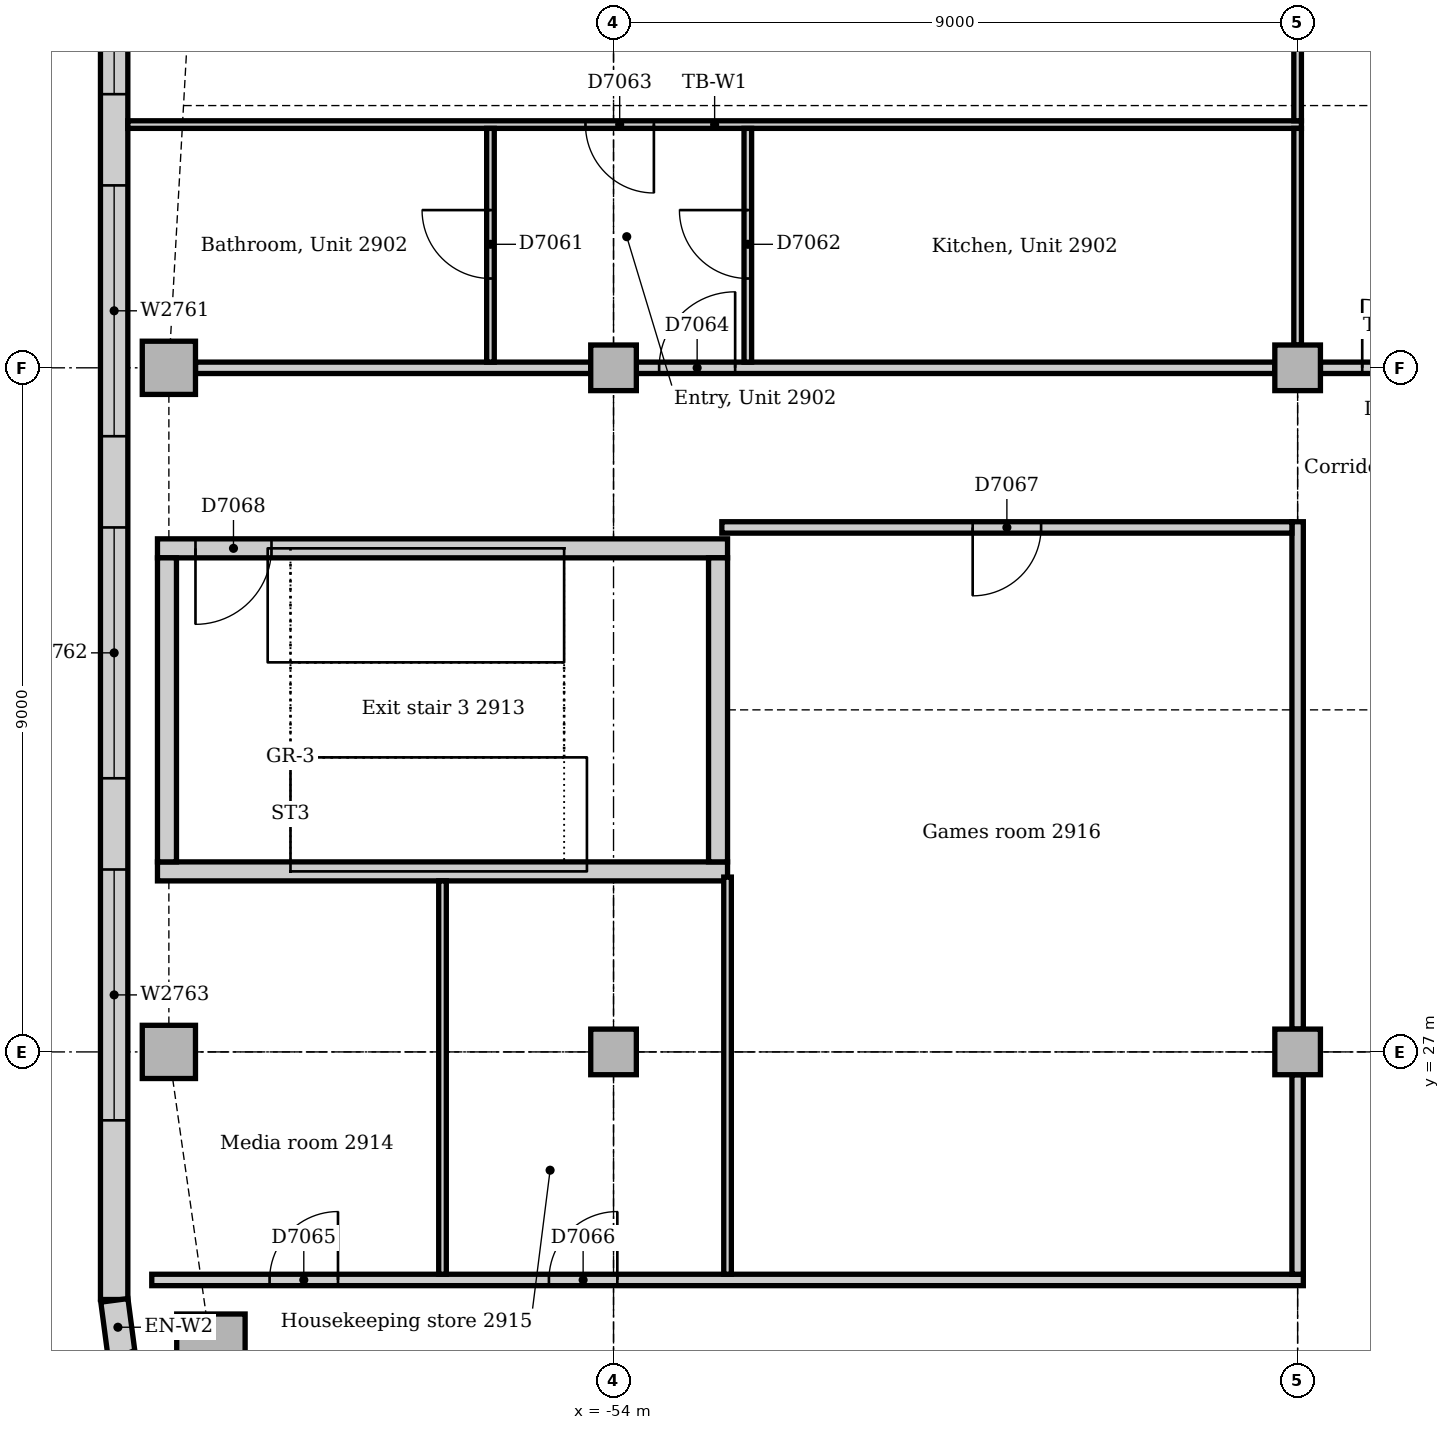
"""IFC4 building model, lengths in metres.
Left out: names, types, materials, properties, quantities, classifications, styles, units other than length and angle.
Written with IfcOpenShell. Run it as: python <this file> out.ifc"""

import sys

from ifc_helpers import new_model, si_unit, direction, frame, frame_2d, origin, origin_2d, place, context, subcontext, project, spatial, rectangle, extrude, element, fill, save


model = new_model("IFC4")
c1 = context("Model", 3, precision=1e-05, world=origin(), true_north=direction((0.0, 1.0)))
c2 = subcontext(c1, "Body", "Model", "MODEL_VIEW")
j1 = project(units=[si_unit("LENGTHUNIT", "METRE"), si_unit("PLANEANGLEUNIT", "RADIAN")], contexts=[c1])
p1 = place(None, origin())
s1 = spatial("IfcSite", under=j1, at=p1, CompositionType="ELEMENT")
p2 = place(p1, origin())
s2 = spatial("IfcBuilding", under=s1, at=p2, CompositionType="ELEMENT")
p3 = place(p2, frame((0.0, 0.0, 124.0)))
s3 = spatial("IfcBuildingStorey", under=s2, at=p3, CompositionType="ELEMENT", Elevation=124.0)
p4 = place(p3, frame((-60.0, 29.375, 0.0), z_axis=(0.0, 0.0, 1.0), x_axis=(1.0, 0.0, 0.0)))
e1 = element("IfcWall", 1, at=p4, inside=s3, PredefinedType="SOLIDWALL", context=c2, shape_type="SweptSolid", body=[
    extrude(rectangle(XDim=7.5, YDim=0.25, at=frame_2d((3.75, 0.0))), origin(), (0.0, 0.0, 1.0), 4.0),
])
p5 = place(p3, frame((-52.5, 33.625, 0.0), z_axis=(0.0, 0.0, 1.0), x_axis=(-1.0, 0.0, 0.0)))
e2 = element("IfcWall", 2, at=p5, inside=s3, PredefinedType="SOLIDWALL", context=c2, shape_type="SweptSolid", body=[
    extrude(rectangle(XDim=7.5, YDim=0.25, at=frame_2d((3.75, 0.0))), origin(), (0.0, 0.0, 1.0), 4.0),
])
p6 = place(p5, frame((6.0, 0.0, 0.0)))
e3 = element("IfcOpeningElement", 3, at=p6, cuts=e2, PredefinedType="OPENING", context=c2, shape_type="SweptSolid", body=[
    extrude(rectangle(XDim=1.0, YDim=2.1, at=frame_2d((0.5, 1.05))), frame((0.0, 0.135, 0.0), z_axis=(0.0, -1.0, 0.0), x_axis=(1.0, 0.0, 0.0)), (0.0, 0.0, 1.0), 0.27),
])
for number, where, z_axis, x_axis in (
    (4, (-52.625, 29.5, 0.0), (0.0, 0.0, 1.0), (0.0, 1.0, 0.0)),
    (5, (-59.875, 33.5, 0.0), (0.0, 0.0, 1.0), (0.0, -1.0, 0.0)),
):
    element("IfcWall", number, at=place(p3, frame(where, z_axis=z_axis, x_axis=x_axis)), inside=s3, PredefinedType="SOLIDWALL", context=c2, shape_type="SweptSolid", body=[
        extrude(rectangle(XDim=4.0, YDim=0.25, at=frame_2d((2.0, 0.0))), origin(), (0.0, 0.0, 1.0), 4.0),
    ])
p7 = place(p3, frame((-59.297, 23.102, 0.0), z_axis=(0.0, 0.0, 1.0), x_axis=(1.0, 0.0, 0.0)))
e6 = element("IfcColumn", 6, at=p7, inside=s3, PredefinedType="COLUMN", context=c2, shape_type="SweptSolid", body=[
    extrude(rectangle(XDim=0.9, YDim=0.9, at=origin_2d()), origin(), (0.0, 0.0, 1.0), 3.85),
])
for number, where, z_axis, x_axis in (
    (7, (-59.85, 27.0, 0.0), (0.0, 0.0, 1.0), (1.0, 0.0, 0.0)),
    (8, (-59.85, 36.0, 0.0), (0.0, 0.0, 1.0), (1.0, 0.0, 0.0)),
):
    element("IfcColumn", number, at=place(p3, frame(where, z_axis=z_axis, x_axis=x_axis)), inside=s3, PredefinedType="COLUMN", context=c2, shape_type="SweptSolid", body=[
        extrude(rectangle(XDim=0.7, YDim=0.7, at=origin_2d()), origin(), (0.0, 0.0, 1.0), 3.85),
    ])
for number, where, z_axis, x_axis in (
    (9, (-54.0, 27.0, 0.0), (0.0, 0.0, 1.0), (1.0, 0.0, 0.0)),
    (10, (-54.0, 36.0, 0.0), (0.0, 0.0, 1.0), (1.0, 0.0, 0.0)),
    (11, (-45.0, 27.0, 0.0), (0.0, 0.0, 1.0), (1.0, 0.0, 0.0)),
    (12, (-45.0, 36.0, 0.0), (0.0, 0.0, 1.0), (1.0, 0.0, 0.0)),
):
    element("IfcColumn", number, at=place(p3, frame(where, z_axis=z_axis, x_axis=x_axis)), inside=s3, PredefinedType="COLUMN", context=c2, shape_type="SweptSolid", body=[
        extrude(rectangle(XDim=0.6, YDim=0.6, at=origin_2d()), origin(), (0.0, 0.0, 1.0), 3.85),
    ])
p8 = place(p3, frame((-60.57, 45.257, 0.0), z_axis=(0.0, 0.0, 1.0), x_axis=(0.0, -1.0, 0.0)))
e13 = element("IfcWall", 13, at=p8, inside=s3, PredefinedType="STANDARD", context=c2, shape_type="SweptSolid", body=[
    extrude(rectangle(XDim=21.515, YDim=0.36, at=frame_2d((10.757, 0.0))), origin(), (0.0, 0.0, 1.0), 3.85),
])
p9 = place(p8, frame((2.357, 0.0, 0.9)))
e14 = element("IfcOpeningElement", 14, at=p9, cuts=e13, PredefinedType="OPENING", context=c2, shape_type="SweptSolid", body=[
    extrude(rectangle(XDim=3.3, YDim=1.6, at=frame_2d((1.65, 0.8))), frame((0.0, 0.19, 0.0), z_axis=(0.0, -1.0, 0.0), x_axis=(1.0, 0.0, 0.0)), (0.0, 0.0, 1.0), 0.38),
])
p10 = place(p8, frame((6.857, 0.0, 0.9)))
e15 = element("IfcOpeningElement", 15, at=p10, cuts=e13, PredefinedType="OPENING", context=c2, shape_type="SweptSolid", body=[
    extrude(rectangle(XDim=3.3, YDim=1.6, at=frame_2d((1.65, 0.8))), frame((0.0, 0.19, 0.0), z_axis=(0.0, -1.0, 0.0), x_axis=(1.0, 0.0, 0.0)), (0.0, 0.0, 1.0), 0.38),
])
p11 = place(p8, frame((11.357, 0.0, 0.9)))
e16 = element("IfcOpeningElement", 16, at=p11, cuts=e13, PredefinedType="OPENING", context=c2, shape_type="SweptSolid", body=[
    extrude(rectangle(XDim=3.3, YDim=1.6, at=frame_2d((1.65, 0.8))), frame((0.0, 0.19, 0.0), z_axis=(0.0, -1.0, 0.0), x_axis=(1.0, 0.0, 0.0)), (0.0, 0.0, 1.0), 0.38),
])
p12 = place(p8, frame((15.857, 0.0, 0.9)))
e17 = element("IfcOpeningElement", 17, at=p12, cuts=e13, PredefinedType="OPENING", context=c2, shape_type="SweptSolid", body=[
    extrude(rectangle(XDim=3.3, YDim=1.6, at=frame_2d((1.65, 0.8))), frame((0.0, 0.19, 0.0), z_axis=(0.0, -1.0, 0.0), x_axis=(1.0, 0.0, 0.0)), (0.0, 0.0, 1.0), 0.38),
])
p13 = place(p3, frame((-60.567, 23.731, 0.0), z_axis=(0.0, 0.0, 1.0), x_axis=(0.13055608231, -0.99144092581, 0.0)))
e18 = element("IfcWall", 18, at=p13, inside=s3, PredefinedType="STANDARD", context=c2, shape_type="SweptSolid", body=[
    extrude(rectangle(XDim=0.713, YDim=0.36, at=frame_2d((0.356, 0.0))), origin(), (0.0, 0.0, 1.0), 3.85),
])
p14 = place(p3, frame((-44.7, 36.0, 0.0), z_axis=(0.0, 0.0, 1.0), x_axis=(1.0, 0.0, 0.0)))
e19 = element("IfcWall", 19, at=p14, inside=s3, PredefinedType="PARTITIONING", context=c2, shape_type="SweptSolid", body=[
    extrude(rectangle(XDim=1.975, YDim=0.15, at=frame_2d((0.988, 0.0))), origin(), (0.0, 0.0, 1.0), 3.602),
])
p15 = place(p14, frame((0.55, 0.0, 0.0)))
e20 = element("IfcOpeningElement", 20, at=p15, cuts=e19, PredefinedType="OPENING", context=c2, shape_type="SweptSolid", body=[
    extrude(rectangle(XDim=0.9, YDim=2.1, at=frame_2d((0.45, 1.05))), frame((0.0, 0.085, 0.0), z_axis=(0.0, -1.0, 0.0), x_axis=(1.0, 0.0, 0.0)), (0.0, 0.0, 1.0), 0.17),
])
p16 = place(p3, frame((-53.7, 36.0, 0.0), z_axis=(0.0, 0.0, 1.0), x_axis=(1.0, 0.0, 0.0)))
e21 = element("IfcWall", 21, at=p16, inside=s3, PredefinedType="PARTITIONING", context=c2, shape_type="SweptSolid", body=[
    extrude(rectangle(XDim=8.4, YDim=0.15, at=frame_2d((4.2, 0.0))), origin(), (0.0, 0.0, 1.0), 3.262),
])
p17 = place(p16, frame((0.3, 0.0, 0.0)))
e22 = element("IfcOpeningElement", 22, at=p17, cuts=e21, PredefinedType="OPENING", context=c2, shape_type="SweptSolid", body=[
    extrude(rectangle(XDim=1.0, YDim=2.1, at=frame_2d((0.5, 1.05))), frame((0.0, 0.085, 0.0), z_axis=(0.0, -1.0, 0.0), x_axis=(1.0, 0.0, 0.0)), (0.0, 0.0, 1.0), 0.17),
])
p18 = place(p3, frame((-59.5, 36.0, 0.0), z_axis=(0.0, 0.0, 1.0), x_axis=(1.0, 0.0, 0.0)))
e23 = element("IfcWall", 23, at=p18, inside=s3, PredefinedType="PARTITIONING", context=c2, shape_type="SweptSolid", body=[
    extrude(rectangle(XDim=5.2, YDim=0.15, at=frame_2d((2.6, 0.0))), origin(), (0.0, 0.0, 1.0), 3.35),
])
p19 = place(p3, frame((-60.075, 24.0, 0.0), z_axis=(0.0, 0.0, 1.0), x_axis=(1.0, 0.0, 0.0)))
e24 = element("IfcWall", 24, at=p19, inside=s3, PredefinedType="PARTITIONING", context=c2, shape_type="SweptSolid", body=[
    extrude(rectangle(XDim=15.15, YDim=0.15, at=frame_2d((7.575, 0.0))), origin(), (0.0, 0.0, 1.0), 3.85),
])
p20 = place(p19, frame((1.55, 0.0, 0.0)))
e25 = element("IfcOpeningElement", 25, at=p20, cuts=e24, PredefinedType="OPENING", context=c2, shape_type="SweptSolid", body=[
    extrude(rectangle(XDim=0.9, YDim=2.1, at=frame_2d((0.45, 1.05))), frame((0.0, 0.085, 0.0), z_axis=(0.0, -1.0, 0.0), x_axis=(1.0, 0.0, 0.0)), (0.0, 0.0, 1.0), 0.17),
])
p21 = place(p19, frame((5.225, 0.0, 0.0)))
e26 = element("IfcOpeningElement", 26, at=p21, cuts=e24, PredefinedType="OPENING", context=c2, shape_type="SweptSolid", body=[
    extrude(rectangle(XDim=0.9, YDim=2.1, at=frame_2d((0.45, 1.05))), frame((0.0, 0.085, 0.0), z_axis=(0.0, -1.0, 0.0), x_axis=(1.0, 0.0, 0.0)), (0.0, 0.0, 1.0), 0.17),
])
p22 = place(p3, frame((-45.0, 24.075, 0.0), z_axis=(0.0, 0.0, 1.0), x_axis=(0.0, 1.0, 0.0)))
e27 = element("IfcWall", 27, at=p22, inside=s3, PredefinedType="PARTITIONING", context=c2, shape_type="SweptSolid", body=[
    extrude(rectangle(XDim=2.625, YDim=0.15, at=frame_2d((1.312, 0.0))), origin(), (0.0, 0.0, 1.0), 3.362),
])
p23 = place(p3, frame((-45.0, 27.3, 0.0), z_axis=(0.0, 0.0, 1.0), x_axis=(0.0, 1.0, 0.0)))
e28 = element("IfcWall", 28, at=p23, inside=s3, PredefinedType="PARTITIONING", context=c2, shape_type="SweptSolid", body=[
    extrude(rectangle(XDim=6.675, YDim=0.15, at=frame_2d((3.337, 0.0))), origin(), (0.0, 0.0, 1.0), 3.362),
])
p24 = place(p3, frame((-52.575, 33.9, 0.0), z_axis=(0.0, 0.0, 1.0), x_axis=(1.0, 0.0, 0.0)))
e29 = element("IfcWall", 29, at=p24, inside=s3, PredefinedType="PARTITIONING", context=c2, shape_type="SweptSolid", body=[
    extrude(rectangle(XDim=7.5, YDim=0.15, at=frame_2d((3.75, 0.0))), origin(), (0.0, 0.0, 1.0), 3.85),
])
p25 = place(p24, frame((3.3, 0.0, 0.0)))
e30 = element("IfcOpeningElement", 30, at=p25, cuts=e29, PredefinedType="OPENING", context=c2, shape_type="SweptSolid", body=[
    extrude(rectangle(XDim=0.9, YDim=2.1, at=frame_2d((0.45, 1.05))), frame((0.0, 0.085, 0.0), z_axis=(0.0, -1.0, 0.0), x_axis=(1.0, 0.0, 0.0)), (0.0, 0.0, 1.0), 0.17),
])
p26 = place(p3, frame((-60.39, 39.2, 0.0), z_axis=(0.0, 0.0, 1.0), x_axis=(1.0, 0.0, 0.0)))
e31 = element("IfcWall", 31, at=p26, inside=s3, PredefinedType="PARTITIONING", context=c2, shape_type="SweptSolid", body=[
    extrude(rectangle(XDim=15.44, YDim=0.1, at=frame_2d((7.72, 0.0))), origin(), (0.0, 0.0, 1.0), 3.85),
])
p27 = place(p26, frame((6.021, 0.0, 0.0)))
e32 = element("IfcOpeningElement", 32, at=p27, cuts=e31, PredefinedType="OPENING", context=c2, shape_type="SweptSolid", body=[
    extrude(rectangle(XDim=0.9, YDim=2.1, at=frame_2d((0.45, 1.05))), frame((0.0, 0.06, 0.0), z_axis=(0.0, -1.0, 0.0), x_axis=(1.0, 0.0, 0.0)), (0.0, 0.0, 1.0), 0.12),
])
p28 = place(p3, frame((-45.0, 39.25, 0.0), z_axis=(0.0, 0.0, 1.0), x_axis=(0.0, 1.0, 0.0)))
e33 = element("IfcWall", 33, at=p28, inside=s3, PredefinedType="PARTITIONING", context=c2, shape_type="SweptSolid", body=[
    extrude(rectangle(XDim=6.8, YDim=0.1, at=frame_2d((3.4, 0.0))), origin(), (0.0, 0.0, 1.0), 3.362),
])
p29 = place(p3, frame((-45.0, 36.3, 0.0), z_axis=(0.0, 0.0, 1.0), x_axis=(0.0, 1.0, 0.0)))
e34 = element("IfcWall", 34, at=p29, inside=s3, PredefinedType="PARTITIONING", context=c2, shape_type="SweptSolid", body=[
    extrude(rectangle(XDim=2.85, YDim=0.1, at=frame_2d((1.425, 0.0))), origin(), (0.0, 0.0, 1.0), 3.362),
])
p30 = place(p3, frame((-56.25, 24.075, 0.0), z_axis=(0.0, 0.0, 1.0), x_axis=(0.0, 1.0, 0.0)))
e35 = element("IfcWall", 35, at=p30, inside=s3, PredefinedType="PARTITIONING", context=c2, shape_type="SweptSolid", body=[
    extrude(rectangle(XDim=5.175, YDim=0.1, at=frame_2d((2.587, 0.0))), origin(), (0.0, 0.0, 1.0), 3.85),
])
p31 = place(p3, frame((-52.5, 24.075, 0.0), z_axis=(0.0, 0.0, 1.0), x_axis=(0.0, 1.0, 0.0)))
e36 = element("IfcWall", 36, at=p31, inside=s3, PredefinedType="PARTITIONING", context=c2, shape_type="SweptSolid", body=[
    extrude(rectangle(XDim=5.225, YDim=0.1, at=frame_2d((2.612, 0.0))), origin(), (0.0, 0.0, 1.0), 3.85),
])
p32 = place(p3, frame((-55.619, 36.075, 0.0), z_axis=(0.0, 0.0, 1.0), x_axis=(0.0, 1.0, 0.0)))
e37 = element("IfcWall", 37, at=p32, inside=s3, PredefinedType="PARTITIONING", context=c2, shape_type="SweptSolid", body=[
    extrude(rectangle(XDim=3.075, YDim=0.1, at=frame_2d((1.538, 0.0))), origin(), (0.0, 0.0, 1.0), 3.85),
])
p33 = place(p32, frame((1.1, 0.0, 0.0)))
e38 = element("IfcOpeningElement", 38, at=p33, cuts=e37, PredefinedType="OPENING", context=c2, shape_type="SweptSolid", body=[
    extrude(rectangle(XDim=0.9, YDim=2.1, at=frame_2d((0.45, 1.05))), frame((0.0, 0.06, 0.0), z_axis=(0.0, -1.0, 0.0), x_axis=(1.0, 0.0, 0.0)), (0.0, 0.0, 1.0), 0.12),
])
p34 = place(p3, frame((-52.233, 36.075, 0.0), z_axis=(0.0, 0.0, 1.0), x_axis=(0.0, 1.0, 0.0)))
e39 = element("IfcWall", 39, at=p34, inside=s3, PredefinedType="PARTITIONING", context=c2, shape_type="SweptSolid", body=[
    extrude(rectangle(XDim=3.075, YDim=0.1, at=frame_2d((1.538, 0.0))), origin(), (0.0, 0.0, 1.0), 3.85),
])
p35 = place(p34, frame((1.1, 0.0, 0.0)))
e40 = element("IfcOpeningElement", 40, at=p35, cuts=e39, PredefinedType="OPENING", context=c2, shape_type="SweptSolid", body=[
    extrude(rectangle(XDim=0.9, YDim=2.1, at=frame_2d((0.45, 1.05))), frame((0.0, 0.06, 0.0), z_axis=(0.0, -1.0, 0.0), x_axis=(1.0, 0.0, 0.0)), (0.0, 0.0, 1.0), 0.12),
])
p36 = place(p9, origin())
e41 = element("IfcWindow", 41, at=p36, inside=s3, PartitioningType="SINGLE_PANEL", PredefinedType="WINDOW", context=c2, shape_type="SweptSolid", body=[
    extrude(rectangle(XDim=3.3, YDim=1.6, at=frame_2d((1.65, 0.8))), frame((0.0, 0.13, 0.0), z_axis=(0.0, -1.0, 0.0), x_axis=(1.0, 0.0, 0.0)), (0.0, 0.0, 1.0), 0.06),
])
fill(e14, e41)
p37 = place(p10, origin())
e42 = element("IfcWindow", 42, at=p37, inside=s3, PartitioningType="SINGLE_PANEL", PredefinedType="WINDOW", context=c2, shape_type="SweptSolid", body=[
    extrude(rectangle(XDim=3.3, YDim=1.6, at=frame_2d((1.65, 0.8))), frame((0.0, 0.13, 0.0), z_axis=(0.0, -1.0, 0.0), x_axis=(1.0, 0.0, 0.0)), (0.0, 0.0, 1.0), 0.06),
])
fill(e15, e42)
p38 = place(p11, origin())
e43 = element("IfcWindow", 43, at=p38, inside=s3, PartitioningType="SINGLE_PANEL", PredefinedType="WINDOW", context=c2, shape_type="SweptSolid", body=[
    extrude(rectangle(XDim=3.3, YDim=1.6, at=frame_2d((1.65, 0.8))), frame((0.0, 0.13, 0.0), z_axis=(0.0, -1.0, 0.0), x_axis=(1.0, 0.0, 0.0)), (0.0, 0.0, 1.0), 0.06),
])
fill(e16, e43)
p39 = place(p12, origin())
e44 = element("IfcWindow", 44, at=p39, inside=s3, PartitioningType="SINGLE_PANEL", PredefinedType="WINDOW", context=c2, shape_type="SweptSolid", body=[
    extrude(rectangle(XDim=3.3, YDim=1.6, at=frame_2d((1.65, 0.8))), frame((0.0, 0.13, 0.0), z_axis=(0.0, -1.0, 0.0), x_axis=(1.0, 0.0, 0.0)), (0.0, 0.0, 1.0), 0.06),
])
fill(e17, e44)
p40 = place(p15, origin())
e45 = element("IfcDoor", 45, at=p40, inside=s3, OperationType="SINGLE_SWING_LEFT", PredefinedType="DOOR", context=c2, shape_type="SweptSolid", body=[
    extrude(rectangle(XDim=0.9, YDim=2.1, at=frame_2d((0.45, 1.05))), frame((0.0, 0.025, 0.0), z_axis=(0.0, -1.0, 0.0), x_axis=(1.0, 0.0, 0.0)), (0.0, 0.0, 1.0), 0.05),
])
fill(e20, e45)
p41 = place(p33, origin())
e46 = element("IfcDoor", 46, at=p41, inside=s3, OperationType="SINGLE_SWING_RIGHT", PredefinedType="DOOR", context=c2, shape_type="SweptSolid", body=[
    extrude(rectangle(XDim=0.9, YDim=2.1, at=frame_2d((0.45, 1.05))), frame((0.0, 0.025, 0.0), z_axis=(0.0, -1.0, 0.0), x_axis=(1.0, 0.0, 0.0)), (0.0, 0.0, 1.0), 0.05),
])
fill(e38, e46)
p42 = place(p35, origin())
e47 = element("IfcDoor", 47, at=p42, inside=s3, OperationType="SINGLE_SWING_RIGHT", PredefinedType="DOOR", context=c2, shape_type="SweptSolid", body=[
    extrude(rectangle(XDim=0.9, YDim=2.1, at=frame_2d((0.45, 1.05))), frame((0.0, 0.025, 0.0), z_axis=(0.0, -1.0, 0.0), x_axis=(1.0, 0.0, 0.0)), (0.0, 0.0, 1.0), 0.05),
])
fill(e40, e47)
p43 = place(p27, frame((0.9, 0.0, 0.0), z_axis=(0.0, 0.0, 1.0), x_axis=(-1.0, 0.0, 0.0)))
e48 = element("IfcDoor", 48, at=p43, inside=s3, OperationType="SINGLE_SWING_LEFT", PredefinedType="DOOR", context=c2, shape_type="SweptSolid", body=[
    extrude(rectangle(XDim=0.9, YDim=2.1, at=frame_2d((0.45, 1.05))), frame((0.0, 0.025, 0.0), z_axis=(0.0, -1.0, 0.0), x_axis=(1.0, 0.0, 0.0)), (0.0, 0.0, 1.0), 0.05),
])
fill(e32, e48)
p44 = place(p17, origin())
e49 = element("IfcDoor", 49, at=p44, inside=s3, OperationType="SINGLE_SWING_RIGHT", PredefinedType="DOOR", context=c2, shape_type="SweptSolid", body=[
    extrude(rectangle(XDim=1.0, YDim=2.1, at=frame_2d((0.5, 1.05))), frame((0.0, 0.025, 0.0), z_axis=(0.0, -1.0, 0.0), x_axis=(1.0, 0.0, 0.0)), (0.0, 0.0, 1.0), 0.05),
])
fill(e22, e49)
p45 = place(p20, origin())
e50 = element("IfcDoor", 50, at=p45, inside=s3, OperationType="SINGLE_SWING_RIGHT", PredefinedType="DOOR", context=c2, shape_type="SweptSolid", body=[
    extrude(rectangle(XDim=0.9, YDim=2.1, at=frame_2d((0.45, 1.05))), frame((0.0, 0.025, 0.0), z_axis=(0.0, -1.0, 0.0), x_axis=(1.0, 0.0, 0.0)), (0.0, 0.0, 1.0), 0.05),
])
fill(e25, e50)
p46 = place(p21, origin())
e51 = element("IfcDoor", 51, at=p46, inside=s3, OperationType="SINGLE_SWING_RIGHT", PredefinedType="DOOR", context=c2, shape_type="SweptSolid", body=[
    extrude(rectangle(XDim=0.9, YDim=2.1, at=frame_2d((0.45, 1.05))), frame((0.0, 0.025, 0.0), z_axis=(0.0, -1.0, 0.0), x_axis=(1.0, 0.0, 0.0)), (0.0, 0.0, 1.0), 0.05),
])
fill(e26, e51)
p47 = place(p25, frame((0.9, 0.0, 0.0), z_axis=(0.0, 0.0, 1.0), x_axis=(-1.0, 0.0, 0.0)))
e52 = element("IfcDoor", 52, at=p47, inside=s3, OperationType="SINGLE_SWING_RIGHT", PredefinedType="DOOR", context=c2, shape_type="SweptSolid", body=[
    extrude(rectangle(XDim=0.9, YDim=2.1, at=frame_2d((0.45, 1.05))), frame((0.0, 0.025, 0.0), z_axis=(0.0, -1.0, 0.0), x_axis=(1.0, 0.0, 0.0)), (0.0, 0.0, 1.0), 0.05),
])
fill(e30, e52)
p48 = place(p6, origin())
e53 = element("IfcDoor", 53, at=p48, inside=s3, OperationType="SINGLE_SWING_RIGHT", PredefinedType="DOOR", context=c2, shape_type="SweptSolid", body=[
    extrude(rectangle(XDim=1.0, YDim=2.1, at=frame_2d((0.5, 1.05))), frame((0.0, 0.025, 0.0), z_axis=(0.0, -1.0, 0.0), x_axis=(1.0, 0.0, 0.0)), (0.0, 0.0, 1.0), 0.05),
])
fill(e3, e53)
save(model, sys.argv[1])
